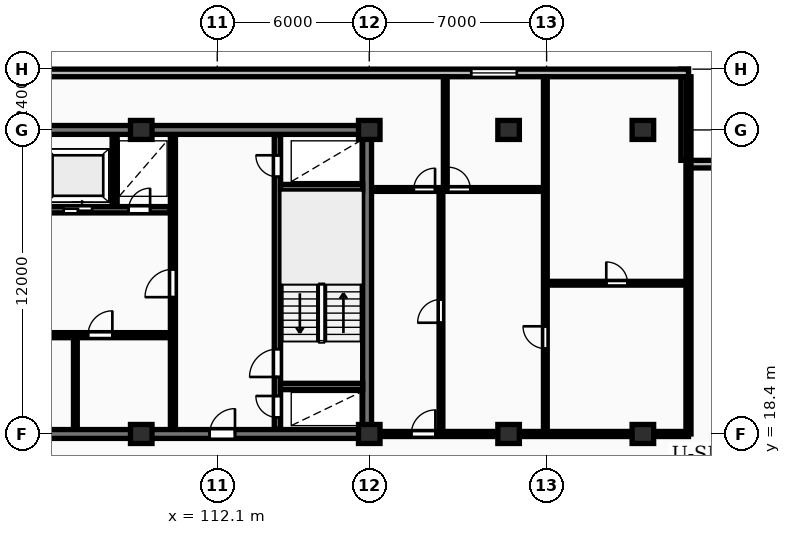
"""IFC4 building model, lengths in metres.
Left out: names, types, materials, properties, quantities, classifications, styles, units other than length and angle.
Written with IfcOpenShell. Run it as: python <this file> out.ifc"""

import sys

from ifc_helpers import new_model, si_unit, direction, frame, frame_2d, origin, origin_2d, place, context, subcontext, project, spatial, rectangle, extrude, element, fill, save


model = new_model("IFC4")
c1 = context("Model", 3, precision=1e-05, world=origin(), true_north=direction((0.0, 1.0)))
c2 = subcontext(c1, "Body", "Model", "MODEL_VIEW")
j1 = project(units=[si_unit("LENGTHUNIT", "METRE"), si_unit("PLANEANGLEUNIT", "RADIAN")], contexts=[c1])
p1 = place(None, origin())
s1 = spatial("IfcSite", under=j1, at=p1, CompositionType="ELEMENT")
p2 = place(p1, origin())
s2 = spatial("IfcBuilding", under=s1, at=p2, CompositionType="ELEMENT")
p3 = place(p2, frame((0.0, 0.0, 126.3)))
s3 = spatial("IfcBuildingStorey", under=s2, at=p3, CompositionType="ELEMENT", Elevation=126.3)
for number, where, z_axis, x_axis in (
    (1, (109.1, 18.4, 0.0), (0.0, 0.0, 1.0), (1.0, 0.0, 0.0)),
    (2, (109.1, 30.4, 0.0), (0.0, 0.0, 1.0), (1.0, 0.0, 0.0)),
    (3, (118.1, 18.4, 0.0), (0.0, 0.0, 1.0), (1.0, 0.0, 0.0)),
    (4, (118.1, 30.4, 0.0), (0.0, 0.0, 1.0), (1.0, 0.0, 0.0)),
    (5, (123.6, 18.4, 0.0), (0.0, 0.0, 1.0), (1.0, 0.0, 0.0)),
    (6, (123.6, 30.4, 0.0), (0.0, 0.0, 1.0), (1.0, 0.0, 0.0)),
    (7, (128.9, 18.4, 0.0), (0.0, 0.0, 1.0), (1.0, 0.0, 0.0)),
    (8, (128.9, 30.4, 0.0), (0.0, 0.0, 1.0), (1.0, 0.0, 0.0)),
):
    element("IfcColumn", number, at=place(p3, frame(where, z_axis=z_axis, x_axis=x_axis)), inside=s3, PredefinedType="COLUMN", context=c2, shape_type="SweptSolid", body=[
        extrude(rectangle(XDim=0.85, YDim=0.75, at=origin_2d()), origin(), (0.0, 0.0, 1.0), 3.25),
    ])
for number, where, z_axis, x_axis in (
    (9, (134.3, 29.05, 0.0), (0.0, 0.0, 1.0), (-1.0, 0.0, 0.0)),
    (10, (130.55, 29.2, 0.0), (0.0, 0.0, 1.0), (0.0, 1.0, 0.0)),
):
    element("IfcWall", number, at=place(p3, frame(where, z_axis=z_axis, x_axis=x_axis)), inside=s3, PredefinedType="STANDARD", context=c2, shape_type="SweptSolid", body=[
        extrude(rectangle(XDim=3.6, YDim=0.3, at=frame_2d((1.8, 0.0))), origin(), (0.0, 0.0, 1.0), 2.97),
    ])
p4 = place(p3, frame((130.7, 32.65, 0.0), z_axis=(0.0, 0.0, 1.0), x_axis=(-1.0, 0.0, 0.0)))
e11 = element("IfcWall", 11, at=p4, inside=s3, PredefinedType="STANDARD", context=c2, shape_type="SweptSolid", body=[
    extrude(rectangle(XDim=58.0, YDim=0.3, at=frame_2d((29.0, 0.0))), origin(), (0.0, 0.0, 1.0), 2.97),
])
p5 = place(p4, frame((50.125, 0.0, 0.85)))
e12 = element("IfcOpeningElement", 12, at=p5, cuts=e11, PredefinedType="OPENING", context=c2, shape_type="SweptSolid", body=[
    extrude(rectangle(XDim=1.8, YDim=1.8, at=frame_2d((0.9, 0.9))), frame((0.0, 0.16, 0.0), z_axis=(0.0, -1.0, 0.0), x_axis=(1.0, 0.0, 0.0)), (0.0, 0.0, 1.0), 0.32),
])
p6 = place(p4, frame((6.775, 0.0, 0.85)))
e13 = element("IfcOpeningElement", 13, at=p6, cuts=e11, PredefinedType="OPENING", context=c2, shape_type="SweptSolid", body=[
    extrude(rectangle(XDim=1.8, YDim=1.8, at=frame_2d((0.9, 0.9))), frame((0.0, 0.16, 0.0), z_axis=(0.0, -1.0, 0.0), x_axis=(1.0, 0.0, 0.0)), (0.0, 0.0, 1.0), 0.32),
])
p7 = place(p3, frame((81.925, 30.4, 0.0), z_axis=(0.0, 0.0, 1.0), x_axis=(1.0, 0.0, 0.0)))
e14 = element("IfcWall", 14, at=p7, inside=s3, PredefinedType="SHEAR", context=c2, shape_type="SweptSolid", body=[
    extrude(rectangle(XDim=36.265, YDim=0.35, at=frame_2d((18.132, 0.0))), origin(), (0.0, 0.0, 1.0), 3.25),
])
p8 = place(p3, frame((118.015, 18.575, 0.0), z_axis=(0.0, 0.0, 1.0), x_axis=(0.0, 1.0, 0.0)))
e15 = element("IfcWall", 15, at=p8, inside=s3, PredefinedType="SHEAR", context=c2, shape_type="SweptSolid", body=[
    extrude(rectangle(XDim=11.65, YDim=0.35, at=frame_2d((5.825, 0.0))), origin(), (0.0, 0.0, 1.0), 3.25),
])
p9 = place(p3, frame((81.925, 18.4, 0.0), z_axis=(0.0, 0.0, 1.0), x_axis=(1.0, 0.0, 0.0)))
e16 = element("IfcWall", 16, at=p9, inside=s3, PredefinedType="SHEAR", context=c2, shape_type="SweptSolid", body=[
    extrude(rectangle(XDim=36.265, YDim=0.35, at=frame_2d((18.132, 0.0))), origin(), (0.0, 0.0, 1.0), 3.25),
])
p10 = place(p9, frame((5.675, 0.0, 0.0)))
e17 = element("IfcOpeningElement", 17, at=p10, cuts=e16, PredefinedType="OPENING", context=c2, shape_type="SweptSolid", body=[
    extrude(rectangle(XDim=1.0, YDim=2.15, at=frame_2d((0.5, 1.075))), frame((0.0, 0.185, 0.0), z_axis=(0.0, -1.0, 0.0), x_axis=(1.0, 0.0, 0.0)), (0.0, 0.0, 1.0), 0.37),
])
p11 = place(p9, frame((21.925, 0.0, 0.0)))
e18 = element("IfcOpeningElement", 18, at=p11, cuts=e16, PredefinedType="OPENING", context=c2, shape_type="SweptSolid", body=[
    extrude(rectangle(XDim=1.5, YDim=2.2, at=frame_2d((0.75, 1.1))), frame((0.0, 0.185, 0.0), z_axis=(0.0, -1.0, 0.0), x_axis=(1.0, 0.0, 0.0)), (0.0, 0.0, 1.0), 0.37),
])
p12 = place(p9, frame((29.875, 0.0, 0.0)))
e19 = element("IfcOpeningElement", 19, at=p12, cuts=e16, PredefinedType="OPENING", context=c2, shape_type="SweptSolid", body=[
    extrude(rectangle(XDim=1.0, YDim=2.15, at=frame_2d((0.5, 1.075))), frame((0.0, 0.185, 0.0), z_axis=(0.0, -1.0, 0.0), x_axis=(1.0, 0.0, 0.0)), (0.0, 0.0, 1.0), 0.37),
])
p13 = place(p3, frame((108.05, 27.38, 0.0), z_axis=(0.0, 0.0, 1.0), x_axis=(0.0, 1.0, 0.0)))
e20 = element("IfcWall", 20, at=p13, inside=s3, PredefinedType="PARTITIONING", context=c2, shape_type="SweptSolid", body=[
    extrude(rectangle(XDim=2.82, YDim=0.2, at=frame_2d((1.41, 0.0))), origin(), (0.0, 0.0, 1.0), 2.97),
])
p14 = place(p3, frame((99.68, 27.25, 0.0), z_axis=(0.0, 0.0, 1.0), x_axis=(1.0, 0.0, 0.0)))
e21 = element("IfcWall", 21, at=p14, inside=s3, PredefinedType="SHEAR", context=c2, shape_type="SweptSolid", body=[
    extrude(rectangle(XDim=10.54, YDim=0.25, at=frame_2d((5.27, 0.0))), origin(), (0.0, 0.0, 1.0), 3.25),
])
p15 = place(p14, frame((0.76, 0.0, 0.0)))
e22 = element("IfcOpeningElement", 22, at=p15, cuts=e21, PredefinedType="OPENING", context=c2, shape_type="SweptSolid", body=[
    extrude(rectangle(XDim=1.12, YDim=2.12, at=frame_2d((0.56, 1.06))), frame((0.0, 0.135, 0.0), z_axis=(0.0, -1.0, 0.0), x_axis=(1.0, 0.0, 0.0)), (0.0, 0.0, 1.0), 0.27),
])
p16 = place(p14, frame((3.56, 0.0, 0.0)))
e23 = element("IfcOpeningElement", 23, at=p16, cuts=e21, PredefinedType="OPENING", context=c2, shape_type="SweptSolid", body=[
    extrude(rectangle(XDim=1.12, YDim=2.12, at=frame_2d((0.56, 1.06))), frame((0.0, 0.135, 0.0), z_axis=(0.0, -1.0, 0.0), x_axis=(1.0, 0.0, 0.0)), (0.0, 0.0, 1.0), 0.27),
])
p17 = place(p14, frame((6.36, 0.0, 0.0)))
e24 = element("IfcOpeningElement", 24, at=p17, cuts=e21, PredefinedType="OPENING", context=c2, shape_type="SweptSolid", body=[
    extrude(rectangle(XDim=1.12, YDim=2.12, at=frame_2d((0.56, 1.06))), frame((0.0, 0.135, 0.0), z_axis=(0.0, -1.0, 0.0), x_axis=(1.0, 0.0, 0.0)), (0.0, 0.0, 1.0), 0.27),
])
p18 = place(p14, frame((8.92, 0.0, 0.0)))
e25 = element("IfcOpeningElement", 25, at=p18, cuts=e21, PredefinedType="OPENING", context=c2, shape_type="SweptSolid", body=[
    extrude(rectangle(XDim=0.85, YDim=2.05, at=frame_2d((0.425, 1.025))), frame((0.0, 0.135, 0.0), z_axis=(0.0, -1.0, 0.0), x_axis=(1.0, 0.0, 0.0)), (0.0, 0.0, 1.0), 0.27),
])
p19 = place(p3, frame((106.5, 18.6, 0.0), z_axis=(0.0, 0.0, 1.0), x_axis=(0.0, 1.0, 0.0)))
e26 = element("IfcWall", 26, at=p19, inside=s3, PredefinedType="PARTITIONING", context=c2, shape_type="SweptSolid", body=[
    extrude(rectangle(XDim=3.6, YDim=0.15, at=frame_2d((1.8, 0.0))), origin(), (0.0, 0.0, 1.0), 2.97),
])
p20 = place(p3, frame((91.08, 22.3, 0.0), z_axis=(0.0, 0.0, 1.0), x_axis=(1.0, 0.0, 0.0)))
e27 = element("IfcWall", 27, at=p20, inside=s3, PredefinedType="PARTITIONING", context=c2, shape_type="SweptSolid", body=[
    extrude(rectangle(XDim=19.14, YDim=0.2, at=frame_2d((9.57, 0.0))), origin(), (0.0, 0.0, 1.0), 2.97),
])
p21 = place(p20, frame((1.15, 0.0, 0.0)))
e28 = element("IfcOpeningElement", 28, at=p21, cuts=e27, PredefinedType="OPENING", context=c2, shape_type="SweptSolid", body=[
    extrude(rectangle(XDim=0.85, YDim=2.05, at=frame_2d((0.425, 1.025))), frame((0.0, 0.11, 0.0), z_axis=(0.0, -1.0, 0.0), x_axis=(1.0, 0.0, 0.0)), (0.0, 0.0, 1.0), 0.22),
])
p22 = place(p20, frame((3.2, 0.0, 0.0)))
e29 = element("IfcOpeningElement", 29, at=p22, cuts=e27, PredefinedType="OPENING", context=c2, shape_type="SweptSolid", body=[
    extrude(rectangle(XDim=0.85, YDim=2.05, at=frame_2d((0.425, 1.025))), frame((0.0, 0.11, 0.0), z_axis=(0.0, -1.0, 0.0), x_axis=(1.0, 0.0, 0.0)), (0.0, 0.0, 1.0), 0.22),
])
p23 = place(p20, frame((12.72, 0.0, 0.0)))
e30 = element("IfcOpeningElement", 30, at=p23, cuts=e27, PredefinedType="OPENING", context=c2, shape_type="SweptSolid", body=[
    extrude(rectangle(XDim=1.5, YDim=2.2, at=frame_2d((0.75, 1.1))), frame((0.0, 0.11, 0.0), z_axis=(0.0, -1.0, 0.0), x_axis=(1.0, 0.0, 0.0)), (0.0, 0.0, 1.0), 0.22),
])
p24 = place(p20, frame((5.52, 0.0, 0.0)))
e31 = element("IfcOpeningElement", 31, at=p24, cuts=e27, PredefinedType="OPENING", context=c2, shape_type="SweptSolid", body=[
    extrude(rectangle(XDim=0.88, YDim=2.06, at=frame_2d((0.44, 1.03))), frame((0.0, 0.11, 0.0), z_axis=(0.0, -1.0, 0.0), x_axis=(1.0, 0.0, 0.0)), (0.0, 0.0, 1.0), 0.22),
])
p25 = place(p20, frame((7.67, 0.0, 0.0)))
e32 = element("IfcOpeningElement", 32, at=p25, cuts=e27, PredefinedType="OPENING", context=c2, shape_type="SweptSolid", body=[
    extrude(rectangle(XDim=0.88, YDim=2.06, at=frame_2d((0.44, 1.03))), frame((0.0, 0.11, 0.0), z_axis=(0.0, -1.0, 0.0), x_axis=(1.0, 0.0, 0.0)), (0.0, 0.0, 1.0), 0.22),
])
p26 = place(p20, frame((10.27, 0.0, 0.0)))
e33 = element("IfcOpeningElement", 33, at=p26, cuts=e27, PredefinedType="OPENING", context=c2, shape_type="SweptSolid", body=[
    extrude(rectangle(XDim=0.85, YDim=2.05, at=frame_2d((0.425, 1.025))), frame((0.0, 0.11, 0.0), z_axis=(0.0, -1.0, 0.0), x_axis=(1.0, 0.0, 0.0)), (0.0, 0.0, 1.0), 0.22),
])
p27 = place(p20, frame((15.92, 0.0, 0.0)))
e34 = element("IfcOpeningElement", 34, at=p27, cuts=e27, PredefinedType="OPENING", context=c2, shape_type="SweptSolid", body=[
    extrude(rectangle(XDim=0.96, YDim=2.1, at=frame_2d((0.48, 1.05))), frame((0.0, 0.11, 0.0), z_axis=(0.0, -1.0, 0.0), x_axis=(1.0, 0.0, 0.0)), (0.0, 0.0, 1.0), 0.22),
])
p28 = place(p3, frame((110.35, 18.6, 0.0), z_axis=(0.0, 0.0, 1.0), x_axis=(0.0, 1.0, 0.0)))
e35 = element("IfcWall", 35, at=p28, inside=s3, PredefinedType="PARTITIONING", context=c2, shape_type="SweptSolid", body=[
    extrude(rectangle(XDim=11.6, YDim=0.2, at=frame_2d((5.8, 0.0))), origin(), (0.0, 0.0, 1.0), 2.97),
])
p29 = place(p28, frame((5.2, 0.0, 0.0)))
e36 = element("IfcOpeningElement", 36, at=p29, cuts=e35, PredefinedType="OPENING", context=c2, shape_type="SweptSolid", body=[
    extrude(rectangle(XDim=1.1, YDim=2.15, at=frame_2d((0.55, 1.075))), frame((0.0, 0.11, 0.0), z_axis=(0.0, -1.0, 0.0), x_axis=(1.0, 0.0, 0.0)), (0.0, 0.0, 1.0), 0.22),
])
p30 = place(p3, frame((114.475, 18.6, 0.0), z_axis=(0.0, 0.0, 1.0), x_axis=(0.0, 1.0, 0.0)))
e37 = element("IfcWall", 37, at=p30, inside=s3, PredefinedType="SHEAR", context=c2, shape_type="SweptSolid", body=[
    extrude(rectangle(XDim=11.6, YDim=0.25, at=frame_2d((5.8, 0.0))), origin(), (0.0, 0.0, 1.0), 3.25),
])
p31 = place(p30, frame((0.45, 0.0, 0.0)))
e38 = element("IfcOpeningElement", 38, at=p31, cuts=e37, PredefinedType="OPENING", context=c2, shape_type="SweptSolid", body=[
    extrude(rectangle(XDim=0.85, YDim=2.05, at=frame_2d((0.425, 1.025))), frame((0.0, 0.135, 0.0), z_axis=(0.0, -1.0, 0.0), x_axis=(1.0, 0.0, 0.0)), (0.0, 0.0, 1.0), 0.27),
])
p32 = place(p30, frame((2.05, 0.0, 0.0)))
e39 = element("IfcOpeningElement", 39, at=p32, cuts=e37, PredefinedType="OPENING", context=c2, shape_type="SweptSolid", body=[
    extrude(rectangle(XDim=1.1, YDim=2.1, at=frame_2d((0.55, 1.05))), frame((0.0, 0.135, 0.0), z_axis=(0.0, -1.0, 0.0), x_axis=(1.0, 0.0, 0.0)), (0.0, 0.0, 1.0), 0.27),
])
p33 = place(p30, frame((9.95, 0.0, 0.0)))
e40 = element("IfcOpeningElement", 40, at=p33, cuts=e37, PredefinedType="OPENING", context=c2, shape_type="SweptSolid", body=[
    extrude(rectangle(XDim=0.85, YDim=2.05, at=frame_2d((0.425, 1.025))), frame((0.0, 0.135, 0.0), z_axis=(0.0, -1.0, 0.0), x_axis=(1.0, 0.0, 0.0)), (0.0, 0.0, 1.0), 0.27),
])
for number, where, z_axis, x_axis in (
    (41, (114.6, 20.275, 0.0), (0.0, 0.0, 1.0), (1.0, 0.0, 0.0)),
    (42, (114.6, 28.125, 0.0), (0.0, 0.0, 1.0), (1.0, 0.0, 0.0)),
):
    element("IfcWall", number, at=place(p3, frame(where, z_axis=z_axis, x_axis=x_axis)), inside=s3, PredefinedType="SHEAR", context=c2, shape_type="SweptSolid", body=[
        extrude(rectangle(XDim=3.24, YDim=0.25, at=frame_2d((1.62, 0.0))), origin(), (0.0, 0.0, 1.0), 3.25),
    ])
p34 = place(p3, frame((130.7, 18.4, 0.0), z_axis=(0.0, 0.0, 1.0), x_axis=(0.0, 1.0, 0.0)))
e43 = element("IfcWall", 43, at=p34, inside=s3, PredefinedType="PARTITIONING", context=c2, shape_type="SweptSolid", body=[
    extrude(rectangle(XDim=14.1, YDim=0.2, at=frame_2d((7.05, 0.0))), origin(), (0.0, 0.0, 1.0), 2.97),
])
p35 = place(p3, frame((125.05, 24.35, 0.0), z_axis=(0.0, 0.0, 1.0), x_axis=(1.0, 0.0, 0.0)))
e44 = element("IfcWall", 44, at=p35, inside=s3, PredefinedType="PARTITIONING", context=c2, shape_type="SweptSolid", body=[
    extrude(rectangle(XDim=5.65, YDim=0.15, at=frame_2d((2.825, 0.0))), origin(), (0.0, 0.0, 1.0), 2.97),
])
p36 = place(p35, frame((2.405, 0.0, 0.0)))
e45 = element("IfcOpeningElement", 45, at=p36, cuts=e44, PredefinedType="OPENING", context=c2, shape_type="SweptSolid", body=[
    extrude(rectangle(XDim=0.84, YDim=2.04, at=frame_2d((0.42, 1.02))), frame((0.0, 0.085, 0.0), z_axis=(0.0, -1.0, 0.0), x_axis=(1.0, 0.0, 0.0)), (0.0, 0.0, 1.0), 0.17),
])
p37 = place(p3, frame((125.05, 18.45, 0.0), z_axis=(0.0, 0.0, 1.0), x_axis=(0.0, 1.0, 0.0)))
e46 = element("IfcWall", 46, at=p37, inside=s3, PredefinedType="PARTITIONING", context=c2, shape_type="SweptSolid", body=[
    extrude(rectangle(XDim=14.05, YDim=0.15, at=frame_2d((7.025, 0.0))), origin(), (0.0, 0.0, 1.0), 2.97),
])
p38 = place(p37, frame((3.32, 0.0, 0.0)))
e47 = element("IfcOpeningElement", 47, at=p38, cuts=e46, PredefinedType="OPENING", context=c2, shape_type="SweptSolid", body=[
    extrude(rectangle(XDim=0.88, YDim=2.06, at=frame_2d((0.44, 1.03))), frame((0.0, 0.085, 0.0), z_axis=(0.0, -1.0, 0.0), x_axis=(1.0, 0.0, 0.0)), (0.0, 0.0, 1.0), 0.17),
])
p39 = place(p3, frame((120.93, 18.45, 0.0), z_axis=(0.0, 0.0, 1.0), x_axis=(0.0, 1.0, 0.0)))
e48 = element("IfcWall", 48, at=p39, inside=s3, PredefinedType="PARTITIONING", context=c2, shape_type="SweptSolid", body=[
    extrude(rectangle(XDim=9.6, YDim=0.15, at=frame_2d((4.8, 0.0))), origin(), (0.0, 0.0, 1.0), 2.97),
])
p40 = place(p39, frame((4.34, 0.0, 0.0)))
e49 = element("IfcOpeningElement", 49, at=p40, cuts=e48, PredefinedType="OPENING", context=c2, shape_type="SweptSolid", body=[
    extrude(rectangle(XDim=0.92, YDim=2.08, at=frame_2d((0.46, 1.04))), frame((0.0, 0.085, 0.0), z_axis=(0.0, -1.0, 0.0), x_axis=(1.0, 0.0, 0.0)), (0.0, 0.0, 1.0), 0.17),
])
p41 = place(p3, frame((121.1, 28.05, 0.0), z_axis=(0.0, 0.0, 1.0), x_axis=(0.0, 1.0, 0.0)))
e50 = element("IfcWall", 50, at=p41, inside=s3, PredefinedType="PARTITIONING", context=c2, shape_type="SweptSolid", body=[
    extrude(rectangle(XDim=4.45, YDim=0.15, at=frame_2d((2.225, 0.0))), origin(), (0.0, 0.0, 1.0), 2.97),
])
p42 = place(p3, frame((118.27, 28.05, 0.0), z_axis=(0.0, 0.0, 1.0), x_axis=(1.0, 0.0, 0.0)))
e51 = element("IfcWall", 51, at=p42, inside=s3, PredefinedType="PARTITIONING", context=c2, shape_type="SweptSolid", body=[
    extrude(rectangle(XDim=6.76, YDim=0.15, at=frame_2d((3.38, 0.0))), origin(), (0.0, 0.0, 1.0), 2.97),
])
p43 = place(p42, frame((1.587, 0.0, 0.0)))
e52 = element("IfcOpeningElement", 52, at=p43, cuts=e51, PredefinedType="OPENING", context=c2, shape_type="SweptSolid", body=[
    extrude(rectangle(XDim=0.84, YDim=2.04, at=frame_2d((0.42, 1.02))), frame((0.0, 0.085, 0.0), z_axis=(0.0, -1.0, 0.0), x_axis=(1.0, 0.0, 0.0)), (0.0, 0.0, 1.0), 0.17),
])
p44 = place(p42, frame((2.94, 0.0, 0.0)))
e53 = element("IfcOpeningElement", 53, at=p44, cuts=e51, PredefinedType="OPENING", context=c2, shape_type="SweptSolid", body=[
    extrude(rectangle(XDim=0.88, YDim=2.06, at=frame_2d((0.44, 1.03))), frame((0.0, 0.085, 0.0), z_axis=(0.0, -1.0, 0.0), x_axis=(1.0, 0.0, 0.0)), (0.0, 0.0, 1.0), 0.17),
])
p45 = place(p3, frame((118.25, 18.4, 0.0), z_axis=(0.0, 0.0, 1.0), x_axis=(1.0, 0.0, 0.0)))
e54 = element("IfcWall", 54, at=p45, inside=s3, PredefinedType="PARTITIONING", context=c2, shape_type="SweptSolid", body=[
    extrude(rectangle(XDim=12.45, YDim=0.2, at=frame_2d((6.225, 0.0))), origin(), (0.0, 0.0, 1.0), 2.358),
])
p46 = place(p45, frame((1.51, 0.0, 0.0)))
e55 = element("IfcOpeningElement", 55, at=p46, cuts=e54, PredefinedType="OPENING", context=c2, shape_type="SweptSolid", body=[
    extrude(rectangle(XDim=0.95, YDim=2.15, at=frame_2d((0.475, 1.075))), frame((0.0, 0.11, 0.0), z_axis=(0.0, -1.0, 0.0), x_axis=(1.0, 0.0, 0.0)), (0.0, 0.0, 1.0), 0.22),
])
p47 = place(p6, origin())
e56 = element("IfcWindow", 56, at=p47, inside=s3, PartitioningType="SINGLE_PANEL", PredefinedType="WINDOW", context=c2, shape_type="SweptSolid", body=[
    extrude(rectangle(XDim=1.8, YDim=1.8, at=frame_2d((0.9, 0.9))), frame((0.0, 0.03, 0.0), z_axis=(0.0, -1.0, 0.0), x_axis=(1.0, 0.0, 0.0)), (0.0, 0.0, 1.0), 0.06),
])
fill(e13, e56)
p48 = place(p12, origin())
e57 = element("IfcDoor", 57, at=p48, inside=s3, OperationType="SINGLE_SWING_RIGHT", PredefinedType="DOOR", context=c2, shape_type="SweptSolid", body=[
    extrude(rectangle(XDim=1.0, YDim=2.15, at=frame_2d((0.5, 1.075))), frame((0.0, 0.025, 0.0), z_axis=(0.0, -1.0, 0.0), x_axis=(1.0, 0.0, 0.0)), (0.0, 0.0, 1.0), 0.05),
])
fill(e19, e57)
p49 = place(p17, origin())
e58 = element("IfcDoor", 58, at=p49, inside=s3, OperationType="SLIDING_TO_RIGHT", PredefinedType="DOOR", context=c2, shape_type="SweptSolid", body=[
    extrude(rectangle(XDim=1.12, YDim=2.12, at=frame_2d((0.56, 1.06))), frame((0.0, 0.025, 0.0), z_axis=(0.0, -1.0, 0.0), x_axis=(1.0, 0.0, 0.0)), (0.0, 0.0, 1.0), 0.05),
])
fill(e24, e58)
p50 = place(p18, origin())
e59 = element("IfcDoor", 59, at=p50, inside=s3, OperationType="SINGLE_SWING_RIGHT", PredefinedType="DOOR", context=c2, shape_type="SweptSolid", body=[
    extrude(rectangle(XDim=0.85, YDim=2.05, at=frame_2d((0.425, 1.025))), frame((0.0, 0.025, 0.0), z_axis=(0.0, -1.0, 0.0), x_axis=(1.0, 0.0, 0.0)), (0.0, 0.0, 1.0), 0.05),
])
fill(e25, e59)
p51 = place(p27, origin())
e60 = element("IfcDoor", 60, at=p51, inside=s3, OperationType="SINGLE_SWING_RIGHT", PredefinedType="DOOR", context=c2, shape_type="SweptSolid", body=[
    extrude(rectangle(XDim=0.96, YDim=2.1, at=frame_2d((0.48, 1.05))), frame((0.0, 0.025, 0.0), z_axis=(0.0, -1.0, 0.0), x_axis=(1.0, 0.0, 0.0)), (0.0, 0.0, 1.0), 0.05),
])
fill(e34, e60)
p52 = place(p29, origin())
e61 = element("IfcDoor", 61, at=p52, inside=s3, OperationType="SINGLE_SWING_LEFT", PredefinedType="DOOR", context=c2, shape_type="SweptSolid", body=[
    extrude(rectangle(XDim=1.1, YDim=2.15, at=frame_2d((0.55, 1.075))), frame((0.0, 0.025, 0.0), z_axis=(0.0, -1.0, 0.0), x_axis=(1.0, 0.0, 0.0)), (0.0, 0.0, 1.0), 0.05),
])
fill(e36, e61)
p53 = place(p31, origin())
e62 = element("IfcDoor", 62, at=p53, inside=s3, OperationType="SINGLE_SWING_RIGHT", PredefinedType="DOOR", context=c2, shape_type="SweptSolid", body=[
    extrude(rectangle(XDim=0.85, YDim=2.05, at=frame_2d((0.425, 1.025))), frame((0.0, 0.025, 0.0), z_axis=(0.0, -1.0, 0.0), x_axis=(1.0, 0.0, 0.0)), (0.0, 0.0, 1.0), 0.05),
])
fill(e38, e62)
p54 = place(p32, origin())
e63 = element("IfcDoor", 63, at=p54, inside=s3, OperationType="SINGLE_SWING_LEFT", PredefinedType="DOOR", context=c2, shape_type="SweptSolid", body=[
    extrude(rectangle(XDim=1.1, YDim=2.1, at=frame_2d((0.55, 1.05))), frame((0.0, 0.025, 0.0), z_axis=(0.0, -1.0, 0.0), x_axis=(1.0, 0.0, 0.0)), (0.0, 0.0, 1.0), 0.05),
])
fill(e39, e63)
p55 = place(p33, origin())
e64 = element("IfcDoor", 64, at=p55, inside=s3, OperationType="SINGLE_SWING_RIGHT", PredefinedType="DOOR", context=c2, shape_type="SweptSolid", body=[
    extrude(rectangle(XDim=0.85, YDim=2.05, at=frame_2d((0.425, 1.025))), frame((0.0, 0.025, 0.0), z_axis=(0.0, -1.0, 0.0), x_axis=(1.0, 0.0, 0.0)), (0.0, 0.0, 1.0), 0.05),
])
fill(e40, e64)
p56 = place(p36, origin())
e65 = element("IfcDoor", 65, at=p56, inside=s3, OperationType="SINGLE_SWING_LEFT", PredefinedType="DOOR", context=c2, shape_type="SweptSolid", body=[
    extrude(rectangle(XDim=0.84, YDim=2.04, at=frame_2d((0.42, 1.02))), frame((0.0, 0.025, 0.0), z_axis=(0.0, -1.0, 0.0), x_axis=(1.0, 0.0, 0.0)), (0.0, 0.0, 1.0), 0.05),
])
fill(e45, e65)
p57 = place(p38, origin())
e66 = element("IfcDoor", 66, at=p57, inside=s3, OperationType="SINGLE_SWING_RIGHT", PredefinedType="DOOR", context=c2, shape_type="SweptSolid", body=[
    extrude(rectangle(XDim=0.88, YDim=2.06, at=frame_2d((0.44, 1.03))), frame((0.0, 0.025, 0.0), z_axis=(0.0, -1.0, 0.0), x_axis=(1.0, 0.0, 0.0)), (0.0, 0.0, 1.0), 0.05),
])
fill(e47, e66)
p58 = place(p40, origin())
e67 = element("IfcDoor", 67, at=p58, inside=s3, OperationType="SINGLE_SWING_LEFT", PredefinedType="DOOR", context=c2, shape_type="SweptSolid", body=[
    extrude(rectangle(XDim=0.92, YDim=2.08, at=frame_2d((0.46, 1.04))), frame((0.0, 0.025, 0.0), z_axis=(0.0, -1.0, 0.0), x_axis=(1.0, 0.0, 0.0)), (0.0, 0.0, 1.0), 0.05),
])
fill(e49, e67)
p59 = place(p43, origin())
e68 = element("IfcDoor", 68, at=p59, inside=s3, OperationType="SINGLE_SWING_RIGHT", PredefinedType="DOOR", context=c2, shape_type="SweptSolid", body=[
    extrude(rectangle(XDim=0.84, YDim=2.04, at=frame_2d((0.42, 1.02))), frame((0.0, 0.025, 0.0), z_axis=(0.0, -1.0, 0.0), x_axis=(1.0, 0.0, 0.0)), (0.0, 0.0, 1.0), 0.05),
])
fill(e52, e68)
p60 = place(p44, origin())
e69 = element("IfcDoor", 69, at=p60, inside=s3, OperationType="SINGLE_SWING_LEFT", PredefinedType="DOOR", context=c2, shape_type="SweptSolid", body=[
    extrude(rectangle(XDim=0.88, YDim=2.06, at=frame_2d((0.44, 1.03))), frame((0.0, 0.025, 0.0), z_axis=(0.0, -1.0, 0.0), x_axis=(1.0, 0.0, 0.0)), (0.0, 0.0, 1.0), 0.05),
])
fill(e53, e69)
p61 = place(p46, origin())
e70 = element("IfcDoor", 70, at=p61, inside=s3, OperationType="SINGLE_SWING_RIGHT", PredefinedType="DOOR", context=c2, shape_type="SweptSolid", body=[
    extrude(rectangle(XDim=0.95, YDim=2.15, at=frame_2d((0.475, 1.075))), frame((0.0, 0.025, 0.0), z_axis=(0.0, -1.0, 0.0), x_axis=(1.0, 0.0, 0.0)), (0.0, 0.0, 1.0), 0.05),
])
fill(e55, e70)
save(model, sys.argv[1])
